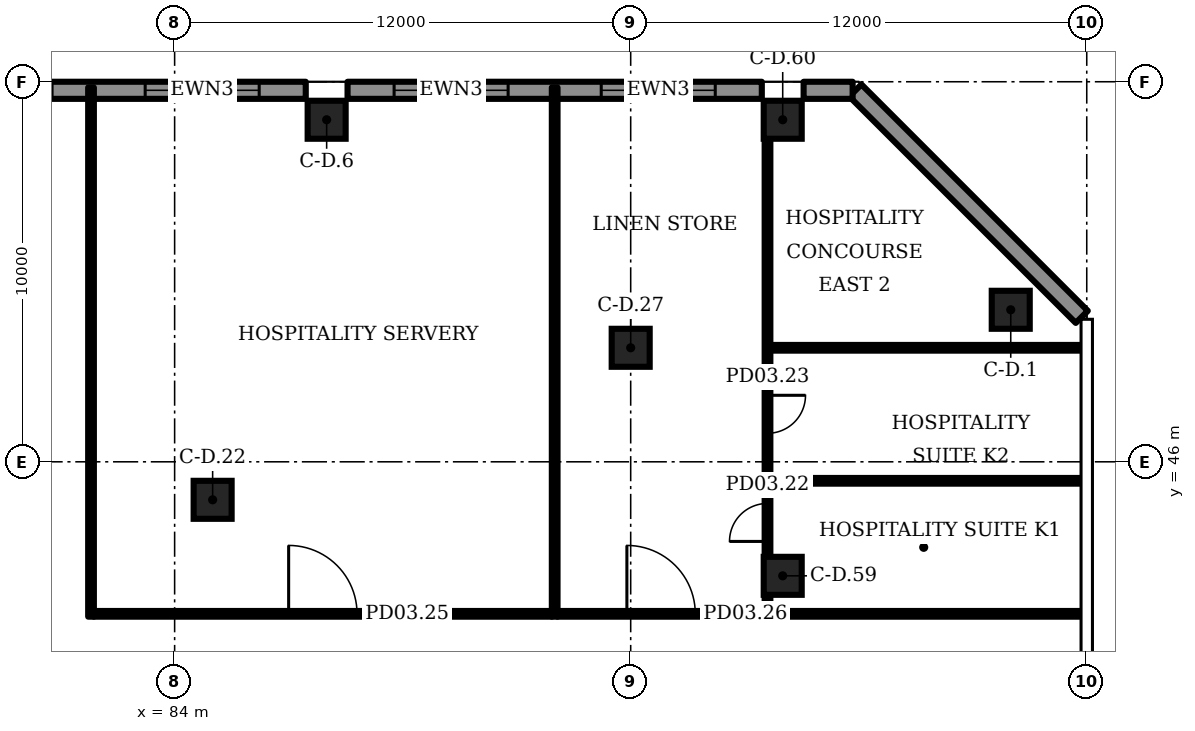
"""IFC4 building model, lengths in metres.
Left out: names, types, materials, properties, quantities, classifications, styles, units other than length and angle.
Written with IfcOpenShell. Run it as: python <this file> out.ifc"""

import sys

from ifc_helpers import new_model, si_unit, direction, frame, frame_2d, origin, origin_2d, place, context, subcontext, project, spatial, rectangle, extrude, element, fill, save


model = new_model("IFC4")
c1 = context("Model", 3, precision=1e-05, world=origin(), true_north=direction((0.0, 1.0)))
c2 = subcontext(c1, "Body", "Model", "MODEL_VIEW")
j1 = project(units=[si_unit("LENGTHUNIT", "METRE"), si_unit("PLANEANGLEUNIT", "RADIAN")], contexts=[c1])
p1 = place(None, origin())
s1 = spatial("IfcSite", under=j1, at=p1, CompositionType="ELEMENT")
p2 = place(p1, origin())
s2 = spatial("IfcBuilding", under=s1, at=p2, CompositionType="ELEMENT")
p3 = place(p2, frame((0.0, 0.0, 21.5)))
s3 = spatial("IfcBuildingStorey", under=s2, at=p3, CompositionType="ELEMENT", Elevation=21.5)
for number, where, z_axis, x_axis in (
    (1, (106.0, 50.0, 0.0), (0.0, 0.0, 1.0), (1.0, 0.0, 0.0)),
    (2, (88.0, 55.0, 0.0), (0.0, 0.0, 1.0), (1.0, 0.0, 0.0)),
    (3, (85.0, 45.0, 0.0), (0.0, 0.0, 1.0), (1.0, 0.0, 0.0)),
    (4, (96.0, 49.0, 0.0), (0.0, 0.0, 1.0), (1.0, 0.0, 0.0)),
    (5, (100.0, 43.0, 0.0), (0.0, 0.0, 1.0), (1.0, 0.0, 0.0)),
    (6, (100.0, 55.0, 0.0), (0.0, 0.0, 1.0), (1.0, 0.0, 0.0)),
):
    element("IfcColumn", number, at=place(p3, frame(where, z_axis=z_axis, x_axis=x_axis)), inside=s3, PredefinedType="COLUMN", context=c2, shape_type="SweptSolid", body=[
        extrude(rectangle(XDim=1.0, YDim=1.0, at=origin_2d()), origin(), (0.0, 0.0, 1.0), 6.0),
    ])
p4 = place(p3, frame((107.869, 49.812, 0.0), z_axis=(0.0, 0.0, 1.0), x_axis=(-0.707092, 0.707121, 0.0)))
e7 = element("IfcWall", 7, at=p4, inside=s3, PredefinedType="SOLIDWALL", context=c2, shape_type="SweptSolid", body=[
    extrude(rectangle(XDim=8.425, YDim=0.45, at=frame_2d((4.213, 0.0))), origin(), (0.0, 0.0, 1.0), 5.7),
])
p5 = place(p3, frame((99.45, 55.775, 0.0), z_axis=(0.0, 0.0, 1.0), x_axis=(-1.0, 0.0, 0.0)))
e8 = element("IfcWall", 8, at=p5, inside=s3, PredefinedType="SOLIDWALL", context=c2, shape_type="SweptSolid", body=[
    extrude(rectangle(XDim=10.9, YDim=0.45, at=frame_2d((5.45, 0.0))), origin(), (0.0, 0.0, 1.0), 5.7),
])
p6 = place(p5, frame((1.225, 0.0, 1.0)))
e9 = element("IfcOpeningElement", 9, at=p6, cuts=e8, PredefinedType="OPENING", context=c2, shape_type="SweptSolid", body=[
    extrude(rectangle(XDim=3.0, YDim=3.7, at=frame_2d((1.5, 1.85))), frame((0.0, 0.235, 0.0), z_axis=(0.0, -1.0, 0.0), x_axis=(1.0, 0.0, 0.0)), (0.0, 0.0, 1.0), 0.47),
])
p7 = place(p5, frame((6.675, 0.0, 1.0)))
e10 = element("IfcOpeningElement", 10, at=p7, cuts=e8, PredefinedType="OPENING", context=c2, shape_type="SweptSolid", body=[
    extrude(rectangle(XDim=3.0, YDim=3.7, at=frame_2d((1.5, 1.85))), frame((0.0, 0.235, 0.0), z_axis=(0.0, -1.0, 0.0), x_axis=(1.0, 0.0, 0.0)), (0.0, 0.0, 1.0), 0.47),
])
p8 = place(p3, frame((87.45, 55.775, 0.0), z_axis=(0.0, 0.0, 1.0), x_axis=(-1.0, 0.0, 0.0)))
e11 = element("IfcWall", 11, at=p8, inside=s3, PredefinedType="SOLIDWALL", context=c2, shape_type="SweptSolid", body=[
    extrude(rectangle(XDim=10.9, YDim=0.45, at=frame_2d((5.45, 0.0))), origin(), (0.0, 0.0, 1.0), 5.7),
])
p9 = place(p8, frame((1.225, 0.0, 1.0)))
e12 = element("IfcOpeningElement", 12, at=p9, cuts=e11, PredefinedType="OPENING", context=c2, shape_type="SweptSolid", body=[
    extrude(rectangle(XDim=3.0, YDim=3.7, at=frame_2d((1.5, 1.85))), frame((0.0, 0.235, 0.0), z_axis=(0.0, -1.0, 0.0), x_axis=(1.0, 0.0, 0.0)), (0.0, 0.0, 1.0), 0.47),
])
p10 = place(p8, frame((6.675, 0.0, 1.0)))
e13 = element("IfcOpeningElement", 13, at=p10, cuts=e11, PredefinedType="OPENING", context=c2, shape_type="SweptSolid", body=[
    extrude(rectangle(XDim=3.0, YDim=3.7, at=frame_2d((1.5, 1.85))), frame((0.0, 0.235, 0.0), z_axis=(0.0, -1.0, 0.0), x_axis=(1.0, 0.0, 0.0)), (0.0, 0.0, 1.0), 0.47),
])
p11 = place(p3, frame((101.84, 55.775, 0.0), z_axis=(0.0, 0.0, 1.0), x_axis=(-1.0, 0.0, 0.0)))
e14 = element("IfcWall", 14, at=p11, inside=s3, PredefinedType="SOLIDWALL", context=c2, shape_type="SweptSolid", body=[
    extrude(rectangle(XDim=1.29, YDim=0.45, at=frame_2d((0.645, 0.0))), origin(), (0.0, 0.0, 1.0), 5.7),
])
p12 = place(p3, frame((81.875, 42.0, 0.0), z_axis=(0.0, 0.0, 1.0), x_axis=(1.0, 0.0, 0.0)))
e15 = element("IfcWall", 15, at=p12, inside=s3, PredefinedType="PARTITIONING", context=c2, shape_type="SweptSolid", body=[
    extrude(rectangle(XDim=12.05, YDim=0.15, at=frame_2d((6.025, 0.0))), origin(), (0.0, 0.0, 1.0), 5.7),
])
p13 = place(p12, frame((5.125, 0.0, 0.0)))
e16 = element("IfcOpeningElement", 16, at=p13, cuts=e15, PredefinedType="OPENING", context=c2, shape_type="SweptSolid", body=[
    extrude(rectangle(XDim=1.8, YDim=2.1, at=frame_2d((0.9, 1.05))), frame((0.0, 0.085, 0.0), z_axis=(0.0, -1.0, 0.0), x_axis=(1.0, 0.0, 0.0)), (0.0, 0.0, 1.0), 0.17),
])
p14 = place(p3, frame((94.075, 42.0, 0.0), z_axis=(0.0, 0.0, 1.0), x_axis=(1.0, 0.0, 0.0)))
e17 = element("IfcWall", 17, at=p14, inside=s3, PredefinedType="PARTITIONING", context=c2, shape_type="SweptSolid", body=[
    extrude(rectangle(XDim=5.45, YDim=0.15, at=frame_2d((2.725, 0.0))), origin(), (0.0, 0.0, 1.0), 5.7),
])
p15 = place(p14, frame((1.825, 0.0, 0.0)))
e18 = element("IfcOpeningElement", 18, at=p15, cuts=e17, PredefinedType="OPENING", context=c2, shape_type="SweptSolid", body=[
    extrude(rectangle(XDim=1.8, YDim=2.1, at=frame_2d((0.9, 1.05))), frame((0.0, 0.085, 0.0), z_axis=(0.0, -1.0, 0.0), x_axis=(1.0, 0.0, 0.0)), (0.0, 0.0, 1.0), 0.17),
])
for number, where, z_axis, x_axis in (
    (19, (99.675, 42.0, 0.0), (0.0, 0.0, 1.0), (1.0, 0.0, 0.0)),
    (20, (99.675, 45.5, 0.0), (0.0, 0.0, 1.0), (1.0, 0.0, 0.0)),
):
    element("IfcWall", number, at=place(p3, frame(where, z_axis=z_axis, x_axis=x_axis)), inside=s3, PredefinedType="PARTITIONING", context=c2, shape_type="SweptSolid", body=[
        extrude(rectangle(XDim=8.22, YDim=0.15, at=frame_2d((4.11, 0.0))), origin(), (0.0, 0.0, 1.0), 5.7),
    ])
p16 = place(p3, frame((99.6, 41.925, 0.0), z_axis=(0.0, 0.0, 1.0), x_axis=(0.0, 1.0, 0.0)))
e21 = element("IfcWall", 21, at=p16, inside=s3, PredefinedType="PARTITIONING", context=c2, shape_type="SweptSolid", body=[
    extrude(rectangle(XDim=0.565, YDim=0.15, at=frame_2d((0.282, 0.0))), origin(), (0.0, 0.0, 1.0), 5.7),
])
p17 = place(p3, frame((99.6, 43.51, 0.0), z_axis=(0.0, 0.0, 1.0), x_axis=(0.0, 1.0, 0.0)))
e22 = element("IfcWall", 22, at=p17, inside=s3, PredefinedType="PARTITIONING", context=c2, shape_type="SweptSolid", body=[
    extrude(rectangle(XDim=10.98, YDim=0.15, at=frame_2d((5.49, 0.0))), origin(), (0.0, 0.0, 1.0), 5.7),
])
p18 = place(p17, frame((0.395, 0.0, 0.0)))
e23 = element("IfcOpeningElement", 23, at=p18, cuts=e22, PredefinedType="OPENING", context=c2, shape_type="SweptSolid", body=[
    extrude(rectangle(XDim=1.0, YDim=2.1, at=frame_2d((0.5, 1.05))), frame((0.0, 0.085, 0.0), z_axis=(0.0, -1.0, 0.0), x_axis=(1.0, 0.0, 0.0)), (0.0, 0.0, 1.0), 0.17),
])
p19 = place(p17, frame((3.24, 0.0, 0.0)))
e24 = element("IfcOpeningElement", 24, at=p19, cuts=e22, PredefinedType="OPENING", context=c2, shape_type="SweptSolid", body=[
    extrude(rectangle(XDim=1.0, YDim=2.1, at=frame_2d((0.5, 1.05))), frame((0.0, 0.085, 0.0), z_axis=(0.0, -1.0, 0.0), x_axis=(1.0, 0.0, 0.0)), (0.0, 0.0, 1.0), 0.17),
])
p20 = place(p3, frame((99.675, 49.0, 0.0), z_axis=(0.0, 0.0, 1.0), x_axis=(1.0, 0.0, 0.0)))
e25 = element("IfcWall", 25, at=p20, inside=s3, PredefinedType="PARTITIONING", context=c2, shape_type="SweptSolid", body=[
    extrude(rectangle(XDim=8.22, YDim=0.15, at=frame_2d((4.11, 0.0))), origin(), (0.0, 0.0, 1.0), 5.7),
])
for number, where, z_axis, x_axis in (
    (26, (94.0, 41.925, 0.0), (0.0, 0.0, 1.0), (0.0, 1.0, 0.0)),
    (27, (81.8, 41.925, 0.0), (0.0, 0.0, 1.0), (0.0, 1.0, 0.0)),
):
    element("IfcWall", number, at=place(p3, frame(where, z_axis=z_axis, x_axis=x_axis)), inside=s3, PredefinedType="PARTITIONING", context=c2, shape_type="SweptSolid", body=[
        extrude(rectangle(XDim=13.925, YDim=0.15, at=frame_2d((6.962, 0.0))), origin(), (0.0, 0.0, 1.0), 5.7),
    ])
p21 = place(p6, origin())
e28 = element("IfcWindow", 28, at=p21, inside=s3, PartitioningType="SINGLE_PANEL", PredefinedType="WINDOW", context=c2, shape_type="SweptSolid", body=[
    extrude(rectangle(XDim=3.0, YDim=3.7, at=frame_2d((1.5, 1.85))), frame((0.0, 0.105, 0.0), z_axis=(0.0, -1.0, 0.0), x_axis=(1.0, 0.0, 0.0)), (0.0, 0.0, 1.0), 0.06),
])
fill(e9, e28)
p22 = place(p7, origin())
e29 = element("IfcWindow", 29, at=p22, inside=s3, PartitioningType="SINGLE_PANEL", PredefinedType="WINDOW", context=c2, shape_type="SweptSolid", body=[
    extrude(rectangle(XDim=3.0, YDim=3.7, at=frame_2d((1.5, 1.85))), frame((0.0, 0.105, 0.0), z_axis=(0.0, -1.0, 0.0), x_axis=(1.0, 0.0, 0.0)), (0.0, 0.0, 1.0), 0.06),
])
fill(e10, e29)
p23 = place(p9, origin())
e30 = element("IfcWindow", 30, at=p23, inside=s3, PartitioningType="SINGLE_PANEL", PredefinedType="WINDOW", context=c2, shape_type="SweptSolid", body=[
    extrude(rectangle(XDim=3.0, YDim=3.7, at=frame_2d((1.5, 1.85))), frame((0.0, 0.105, 0.0), z_axis=(0.0, -1.0, 0.0), x_axis=(1.0, 0.0, 0.0)), (0.0, 0.0, 1.0), 0.06),
])
fill(e12, e30)
p24 = place(p18, origin())
e31 = element("IfcDoor", 31, at=p24, inside=s3, OperationType="SINGLE_SWING_LEFT", PredefinedType="DOOR", context=c2, shape_type="SweptSolid", body=[
    extrude(rectangle(XDim=1.0, YDim=2.1, at=frame_2d((0.5, 1.05))), frame((0.0, 0.025, 0.0), z_axis=(0.0, -1.0, 0.0), x_axis=(1.0, 0.0, 0.0)), (0.0, 0.0, 1.0), 0.05),
])
fill(e23, e31)
p25 = place(p19, origin())
e32 = element("IfcDoor", 32, at=p25, inside=s3, OperationType="SINGLE_SWING_RIGHT", PredefinedType="DOOR", context=c2, shape_type="SweptSolid", body=[
    extrude(rectangle(XDim=1.0, YDim=2.1, at=frame_2d((0.5, 1.05))), frame((0.0, 0.025, 0.0), z_axis=(0.0, -1.0, 0.0), x_axis=(1.0, 0.0, 0.0)), (0.0, 0.0, 1.0), 0.05),
])
fill(e24, e32)
p26 = place(p13, origin())
e33 = element("IfcDoor", 33, at=p26, inside=s3, OperationType="DOUBLE_DOOR_SINGLE_SWING", PredefinedType="DOOR", context=c2, shape_type="SweptSolid", body=[
    extrude(rectangle(XDim=1.8, YDim=2.1, at=frame_2d((0.9, 1.05))), frame((0.0, 0.025, 0.0), z_axis=(0.0, -1.0, 0.0), x_axis=(1.0, 0.0, 0.0)), (0.0, 0.0, 1.0), 0.05),
])
fill(e16, e33)
p27 = place(p15, origin())
e34 = element("IfcDoor", 34, at=p27, inside=s3, OperationType="DOUBLE_DOOR_SINGLE_SWING", PredefinedType="DOOR", context=c2, shape_type="SweptSolid", body=[
    extrude(rectangle(XDim=1.8, YDim=2.1, at=frame_2d((0.9, 1.05))), frame((0.0, 0.025, 0.0), z_axis=(0.0, -1.0, 0.0), x_axis=(1.0, 0.0, 0.0)), (0.0, 0.0, 1.0), 0.05),
])
fill(e18, e34)
save(model, sys.argv[1])
